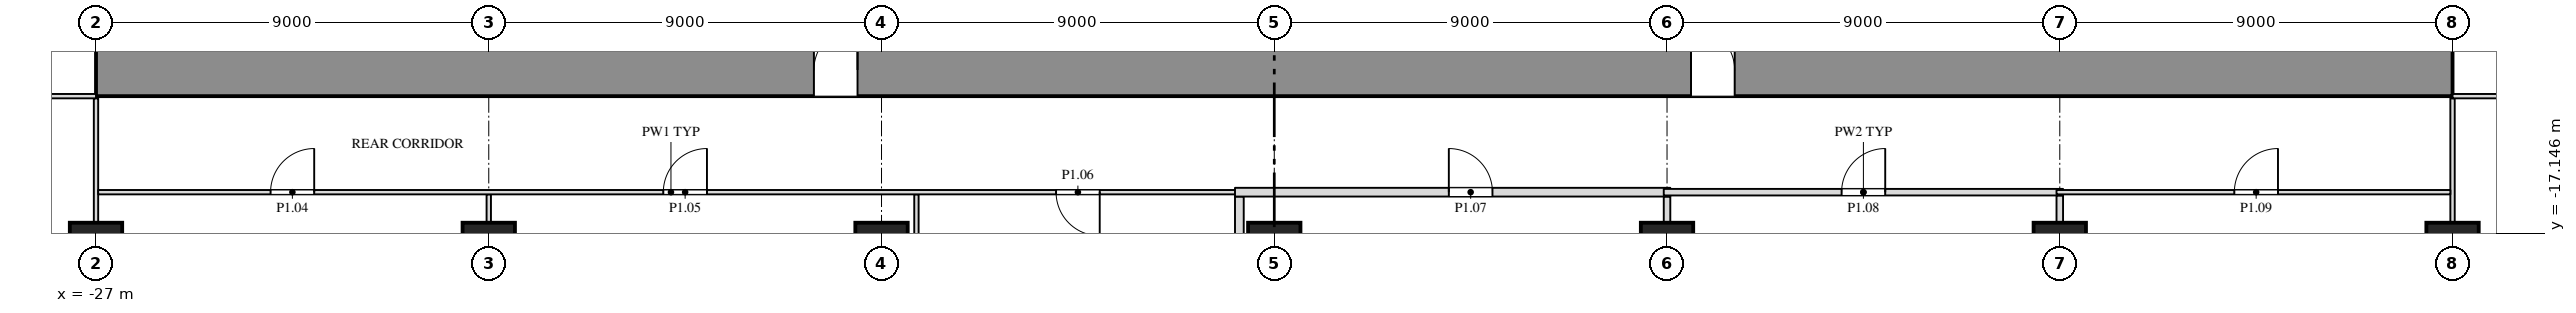
"""IFC4 building model, lengths in metres.
Left out: names, types, materials, properties, quantities, classifications, styles, units other than length and angle.
Written with IfcOpenShell. Run it as: python <this file> out.ifc"""

import sys

from ifc_helpers import new_model, si_unit, direction, frame, frame_2d, origin, origin_2d, place, context, subcontext, project, spatial, rectangle, extrude, element, fill, save


model = new_model("IFC4")
c1 = context("Model", 3, precision=1e-05, world=origin(), true_north=direction((0.0, 1.0)))
c2 = subcontext(c1, "Body", "Model", "MODEL_VIEW")
j1 = project(units=[si_unit("LENGTHUNIT", "METRE"), si_unit("PLANEANGLEUNIT", "RADIAN")], contexts=[c1])
p1 = place(None, origin())
s1 = spatial("IfcSite", under=j1, at=p1, CompositionType="ELEMENT")
p2 = place(p1, origin())
s2 = spatial("IfcBuilding", under=s1, at=p2, CompositionType="ELEMENT")
p3 = place(p2, frame((0.0, 0.0, 9.0)))
s3 = spatial("IfcBuildingStorey", under=s2, at=p3, CompositionType="ELEMENT", Elevation=9.0)
for number, where, z_axis, x_axis in (
    (1, (-27.0, -17.5, 0.0), (0.0, 0.0, 1.0), (1.0, 0.0, 0.0)),
    (2, (-18.0, -17.5, 0.0), (0.0, 0.0, 1.0), (1.0, 0.0, 0.0)),
    (3, (-9.0, -17.5, 0.0), (0.0, 0.0, 1.0), (1.0, 0.0, 0.0)),
    (4, (0.0, -17.5, 0.0), (0.0, 0.0, 1.0), (1.0, 0.0, 0.0)),
    (5, (9.0, -17.5, 0.0), (0.0, 0.0, 1.0), (1.0, 0.0, 0.0)),
    (6, (18.0, -17.5, 0.0), (0.0, 0.0, 1.0), (1.0, 0.0, 0.0)),
    (7, (27.0, -17.5, 0.0), (0.0, 0.0, 1.0), (1.0, 0.0, 0.0)),
):
    element("IfcColumn", number, at=place(p3, frame(where, z_axis=z_axis, x_axis=x_axis)), inside=s3, PredefinedType="COLUMN", context=c2, shape_type="SweptSolid", body=[
        extrude(rectangle(XDim=1.2, YDim=1.2, at=origin_2d()), origin(), (0.0, 0.0, 1.0), 6.0),
    ])
p4 = place(p3, frame((-27.0, -13.4, 0.0), z_axis=(0.0, 0.0, 1.0), x_axis=(1.0, 0.0, 0.0)))
e8 = element("IfcWall", 8, at=p4, inside=s3, PredefinedType="SHEAR", context=c2, shape_type="SweptSolid", body=[
    extrude(rectangle(XDim=54.0, YDim=1.2, at=frame_2d((27.0, 0.0))), origin(), (0.0, 0.0, 1.0), 5.7),
])
p5 = place(p4, frame((16.45, 0.0, 0.0)))
e9 = element("IfcOpeningElement", 9, at=p5, cuts=e8, PredefinedType="OPENING", context=c2, shape_type="SweptSolid", body=[
    extrude(rectangle(XDim=1.0, YDim=2.1, at=frame_2d((0.5, 1.05))), frame((0.0, 0.612, 0.0), z_axis=(0.0, -1.0, 0.0), x_axis=(1.0, 0.0, 0.0)), (0.0, 0.0, 1.0), 1.224),
])
p6 = place(p4, frame((36.55, 0.0, 0.0)))
e10 = element("IfcOpeningElement", 10, at=p6, cuts=e8, PredefinedType="OPENING", context=c2, shape_type="SweptSolid", body=[
    extrude(rectangle(XDim=1.0, YDim=2.1, at=frame_2d((0.5, 1.05))), frame((0.0, 0.612, 0.0), z_axis=(0.0, -1.0, 0.0), x_axis=(1.0, 0.0, 0.0)), (0.0, 0.0, 1.0), 1.224),
])
p7 = place(p3, frame((-27.0, -16.9, 0.0), z_axis=(0.0, 0.0, 1.0), x_axis=(0.0, 1.0, 0.0)))
e11 = element("IfcWall", 11, at=p7, inside=s3, PredefinedType="PARTITIONING", context=c2, shape_type="SweptSolid", body=[
    extrude(rectangle(XDim=2.85, YDim=0.1, at=frame_2d((1.425, 0.0))), origin(), (0.0, 0.0, 1.0), 5.088),
])
p8 = place(p3, frame((-18.0, -16.9, 0.0), z_axis=(0.0, 0.0, 1.0), x_axis=(0.0, 1.0, 0.0)))
e12 = element("IfcWall", 12, at=p8, inside=s3, PredefinedType="PARTITIONING", context=c2, shape_type="SweptSolid", body=[
    extrude(rectangle(XDim=0.65, YDim=0.1, at=frame_2d((0.325, 0.0))), origin(), (0.0, 0.0, 1.0), 5.7),
])
p9 = place(p3, frame((-8.2, -27.2, 0.0), z_axis=(0.0, 0.0, 1.0), x_axis=(0.0, 1.0, 0.0)))
e13 = element("IfcWall", 13, at=p9, inside=s3, PredefinedType="PARTITIONING", context=c2, shape_type="SweptSolid", body=[
    extrude(rectangle(XDim=10.95, YDim=0.1, at=frame_2d((5.475, 0.0))), origin(), (0.0, 0.0, 1.0), 5.7),
])
p10 = place(p3, frame((-0.8, -27.2, 0.0), z_axis=(0.0, 0.0, 1.0), x_axis=(0.0, 1.0, 0.0)))
e14 = element("IfcWall", 14, at=p10, inside=s3, PredefinedType="PARTITIONING", context=c2, shape_type="SweptSolid", body=[
    extrude(rectangle(XDim=10.9, YDim=0.2, at=frame_2d((5.45, 0.0))), origin(), (0.0, 0.0, 1.0), 5.7),
])
p11 = place(p3, frame((9.0, -16.9, 0.0), z_axis=(0.0, 0.0, 1.0), x_axis=(0.0, 1.0, 0.0)))
e15 = element("IfcWall", 15, at=p11, inside=s3, PredefinedType="PARTITIONING", context=c2, shape_type="SweptSolid", body=[
    extrude(rectangle(XDim=0.6, YDim=0.15, at=frame_2d((0.3, 0.0))), origin(), (0.0, 0.0, 1.0), 5.7),
])
p12 = place(p3, frame((18.0, -16.9, 0.0), z_axis=(0.0, 0.0, 1.0), x_axis=(0.0, 1.0, 0.0)))
e16 = element("IfcWall", 16, at=p12, inside=s3, PredefinedType="PARTITIONING", context=c2, shape_type="SweptSolid", body=[
    extrude(rectangle(XDim=0.625, YDim=0.15, at=frame_2d((0.312, 0.0))), origin(), (0.0, 0.0, 1.0), 5.7),
])
p13 = place(p3, frame((27.0, -16.9, 0.0), z_axis=(0.0, 0.0, 1.0), x_axis=(0.0, 1.0, 0.0)))
e17 = element("IfcWall", 17, at=p13, inside=s3, PredefinedType="PARTITIONING", context=c2, shape_type="SweptSolid", body=[
    extrude(rectangle(XDim=2.85, YDim=0.1, at=frame_2d((1.425, 0.0))), origin(), (0.0, 0.0, 1.0), 5.088),
])
p14 = place(p3, frame((-26.95, -16.2, 0.0), z_axis=(0.0, 0.0, 1.0), x_axis=(1.0, 0.0, 0.0)))
e18 = element("IfcWall", 18, at=p14, inside=s3, PredefinedType="PARTITIONING", context=c2, shape_type="SweptSolid", body=[
    extrude(rectangle(XDim=26.25, YDim=0.1, at=frame_2d((13.125, 0.0))), origin(), (0.0, 0.0, 1.0), 5.7),
])
p15 = place(p14, frame((3.95, 0.0, 0.0)))
e19 = element("IfcOpeningElement", 19, at=p15, cuts=e18, PredefinedType="OPENING", context=c2, shape_type="SweptSolid", body=[
    extrude(rectangle(XDim=1.0, YDim=2.1, at=frame_2d((0.5, 1.05))), frame((0.0, 0.062, 0.0), z_axis=(0.0, -1.0, 0.0), x_axis=(1.0, 0.0, 0.0)), (0.0, 0.0, 1.0), 0.124),
])
p16 = place(p14, frame((12.95, 0.0, 0.0)))
e20 = element("IfcOpeningElement", 20, at=p16, cuts=e18, PredefinedType="OPENING", context=c2, shape_type="SweptSolid", body=[
    extrude(rectangle(XDim=1.0, YDim=2.1, at=frame_2d((0.5, 1.05))), frame((0.0, 0.062, 0.0), z_axis=(0.0, -1.0, 0.0), x_axis=(1.0, 0.0, 0.0)), (0.0, 0.0, 1.0), 0.124),
])
p17 = place(p14, frame((21.95, 0.0, 0.0)))
e21 = element("IfcOpeningElement", 21, at=p17, cuts=e18, PredefinedType="OPENING", context=c2, shape_type="SweptSolid", body=[
    extrude(rectangle(XDim=1.0, YDim=2.1, at=frame_2d((0.5, 1.05))), frame((0.0, 0.062, 0.0), z_axis=(0.0, -1.0, 0.0), x_axis=(1.0, 0.0, 0.0)), (0.0, 0.0, 1.0), 0.124),
])
p18 = place(p3, frame((-0.9, -16.2, 0.0), z_axis=(0.0, 0.0, 1.0), x_axis=(1.0, 0.0, 0.0)))
e22 = element("IfcWall", 22, at=p18, inside=s3, PredefinedType="PARTITIONING", context=c2, shape_type="SweptSolid", body=[
    extrude(rectangle(XDim=9.975, YDim=0.2, at=frame_2d((4.987, 0.0))), origin(), (0.0, 0.0, 1.0), 5.7),
])
p19 = place(p18, frame((4.9, 0.0, 0.0)))
e23 = element("IfcOpeningElement", 23, at=p19, cuts=e22, PredefinedType="OPENING", context=c2, shape_type="SweptSolid", body=[
    extrude(rectangle(XDim=1.0, YDim=2.1, at=frame_2d((0.5, 1.05))), frame((0.0, 0.112, 0.0), z_axis=(0.0, -1.0, 0.0), x_axis=(1.0, 0.0, 0.0)), (0.0, 0.0, 1.0), 0.224),
])
p20 = place(p3, frame((8.925, -16.2, 0.0), z_axis=(0.0, 0.0, 1.0), x_axis=(1.0, 0.0, 0.0)))
e24 = element("IfcWall", 24, at=p20, inside=s3, PredefinedType="PARTITIONING", context=c2, shape_type="SweptSolid", body=[
    extrude(rectangle(XDim=9.15, YDim=0.15, at=frame_2d((4.575, 0.0))), origin(), (0.0, 0.0, 1.0), 5.7),
])
p21 = place(p20, frame((4.075, 0.0, 0.0)))
e25 = element("IfcOpeningElement", 25, at=p21, cuts=e24, PredefinedType="OPENING", context=c2, shape_type="SweptSolid", body=[
    extrude(rectangle(XDim=1.0, YDim=2.1, at=frame_2d((0.5, 1.05))), frame((0.0, 0.087, 0.0), z_axis=(0.0, -1.0, 0.0), x_axis=(1.0, 0.0, 0.0)), (0.0, 0.0, 1.0), 0.174),
])
p22 = place(p3, frame((17.925, -16.2, 0.0), z_axis=(0.0, 0.0, 1.0), x_axis=(1.0, 0.0, 0.0)))
e26 = element("IfcWall", 26, at=p22, inside=s3, PredefinedType="PARTITIONING", context=c2, shape_type="SweptSolid", body=[
    extrude(rectangle(XDim=9.025, YDim=0.1, at=frame_2d((4.512, 0.0))), origin(), (0.0, 0.0, 1.0), 5.7),
])
p23 = place(p22, frame((4.075, 0.0, 0.0)))
e27 = element("IfcOpeningElement", 27, at=p23, cuts=e26, PredefinedType="OPENING", context=c2, shape_type="SweptSolid", body=[
    extrude(rectangle(XDim=1.0, YDim=2.1, at=frame_2d((0.5, 1.05))), frame((0.0, 0.062, 0.0), z_axis=(0.0, -1.0, 0.0), x_axis=(1.0, 0.0, 0.0)), (0.0, 0.0, 1.0), 0.124),
])
p24 = place(p3, frame((-38.2, -14.0, 0.0), z_axis=(0.0, 0.0, 1.0), x_axis=(1.0, 0.0, 0.0)))
e28 = element("IfcWall", 28, at=p24, inside=s3, PredefinedType="PARTITIONING", context=c2, shape_type="SweptSolid", body=[
    extrude(rectangle(XDim=11.2, YDim=0.1, at=frame_2d((5.6, 0.0))), origin(), (0.0, 0.0, 1.0), 5.7),
])
p25 = place(p24, frame((3.2, 0.0, 0.0)))
e29 = element("IfcOpeningElement", 29, at=p25, cuts=e28, PredefinedType="OPENING", context=c2, shape_type="SweptSolid", body=[
    extrude(rectangle(XDim=1.0, YDim=2.1, at=frame_2d((0.5, 1.05))), frame((0.0, 0.062, 0.0), z_axis=(0.0, -1.0, 0.0), x_axis=(1.0, 0.0, 0.0)), (0.0, 0.0, 1.0), 0.124),
])
p26 = place(p3, frame((27.0, -14.0, 0.0), z_axis=(0.0, 0.0, 1.0), x_axis=(1.0, 0.0, 0.0)))
e30 = element("IfcWall", 30, at=p26, inside=s3, PredefinedType="PARTITIONING", context=c2, shape_type="SweptSolid", body=[
    extrude(rectangle(XDim=11.2, YDim=0.1, at=frame_2d((5.6, 0.0))), origin(), (0.0, 0.0, 1.0), 5.7),
])
p27 = place(p26, frame((7.0, 0.0, 0.0)))
e31 = element("IfcOpeningElement", 31, at=p27, cuts=e30, PredefinedType="OPENING", context=c2, shape_type="SweptSolid", body=[
    extrude(rectangle(XDim=1.0, YDim=2.1, at=frame_2d((0.5, 1.05))), frame((0.0, 0.062, 0.0), z_axis=(0.0, -1.0, 0.0), x_axis=(1.0, 0.0, 0.0)), (0.0, 0.0, 1.0), 0.124),
])
p28 = place(p15, origin())
e32 = element("IfcDoor", 32, at=p28, inside=s3, OperationType="SINGLE_SWING_RIGHT", PredefinedType="DOOR", context=c2, shape_type="SweptSolid", body=[
    extrude(rectangle(XDim=1.0, YDim=2.1, at=frame_2d((0.5, 1.05))), frame((0.0, 0.025, 0.0), z_axis=(0.0, -1.0, 0.0), x_axis=(1.0, 0.0, 0.0)), (0.0, 0.0, 1.0), 0.05),
])
fill(e19, e32)
p29 = place(p16, origin())
e33 = element("IfcDoor", 33, at=p29, inside=s3, OperationType="SINGLE_SWING_RIGHT", PredefinedType="DOOR", context=c2, shape_type="SweptSolid", body=[
    extrude(rectangle(XDim=1.0, YDim=2.1, at=frame_2d((0.5, 1.05))), frame((0.0, 0.025, 0.0), z_axis=(0.0, -1.0, 0.0), x_axis=(1.0, 0.0, 0.0)), (0.0, 0.0, 1.0), 0.05),
])
fill(e20, e33)
p30 = place(p17, origin())
e34 = element("IfcDoor", 34, at=p30, inside=s3, OperationType="SINGLE_SWING_LEFT", PredefinedType="DOOR", context=c2, shape_type="SweptSolid", body=[
    extrude(rectangle(XDim=1.0, YDim=2.1, at=frame_2d((0.5, 1.05))), frame((0.0, 0.025, 0.0), z_axis=(0.0, -1.0, 0.0), x_axis=(1.0, 0.0, 0.0)), (0.0, 0.0, 1.0), 0.05),
])
fill(e21, e34)
p31 = place(p19, origin())
e35 = element("IfcDoor", 35, at=p31, inside=s3, OperationType="SINGLE_SWING_LEFT", PredefinedType="DOOR", context=c2, shape_type="SweptSolid", body=[
    extrude(rectangle(XDim=1.0, YDim=2.1, at=frame_2d((0.5, 1.05))), frame((0.0, 0.025, 0.0), z_axis=(0.0, -1.0, 0.0), x_axis=(1.0, 0.0, 0.0)), (0.0, 0.0, 1.0), 0.05),
])
fill(e23, e35)
p32 = place(p21, origin())
e36 = element("IfcDoor", 36, at=p32, inside=s3, OperationType="SINGLE_SWING_RIGHT", PredefinedType="DOOR", context=c2, shape_type="SweptSolid", body=[
    extrude(rectangle(XDim=1.0, YDim=2.1, at=frame_2d((0.5, 1.05))), frame((0.0, 0.025, 0.0), z_axis=(0.0, -1.0, 0.0), x_axis=(1.0, 0.0, 0.0)), (0.0, 0.0, 1.0), 0.05),
])
fill(e25, e36)
p33 = place(p23, origin())
e37 = element("IfcDoor", 37, at=p33, inside=s3, OperationType="SINGLE_SWING_RIGHT", PredefinedType="DOOR", context=c2, shape_type="SweptSolid", body=[
    extrude(rectangle(XDim=1.0, YDim=2.1, at=frame_2d((0.5, 1.05))), frame((0.0, 0.025, 0.0), z_axis=(0.0, -1.0, 0.0), x_axis=(1.0, 0.0, 0.0)), (0.0, 0.0, 1.0), 0.05),
])
fill(e27, e37)
p34 = place(p5, origin())
e38 = element("IfcDoor", 38, at=p34, inside=s3, OperationType="SINGLE_SWING_RIGHT", PredefinedType="DOOR", context=c2, shape_type="SweptSolid", body=[
    extrude(rectangle(XDim=1.0, YDim=2.1, at=frame_2d((0.5, 1.05))), frame((0.0, 0.025, 0.0), z_axis=(0.0, -1.0, 0.0), x_axis=(1.0, 0.0, 0.0)), (0.0, 0.0, 1.0), 0.05),
])
fill(e9, e38)
p35 = place(p6, origin())
e39 = element("IfcDoor", 39, at=p35, inside=s3, OperationType="SINGLE_SWING_LEFT", PredefinedType="DOOR", context=c2, shape_type="SweptSolid", body=[
    extrude(rectangle(XDim=1.0, YDim=2.1, at=frame_2d((0.5, 1.05))), frame((0.0, 0.025, 0.0), z_axis=(0.0, -1.0, 0.0), x_axis=(1.0, 0.0, 0.0)), (0.0, 0.0, 1.0), 0.05),
])
fill(e10, e39)
save(model, sys.argv[1])
